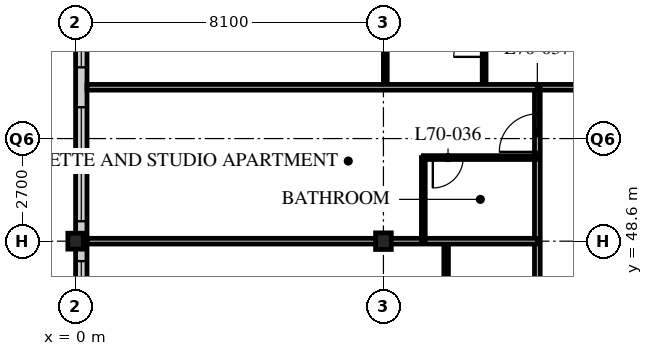
"""IFC4 building model, lengths in metres.
Left out: names, types, materials, properties, quantities, classifications, styles, units other than length and angle.
Written with IfcOpenShell. Run it as: python <this file> out.ifc"""

import sys

from ifc_helpers import new_model, si_unit, direction, frame, frame_2d, origin, origin_2d, place, context, subcontext, project, spatial, rectangle, i_section, extrude, element, fill, save


model = new_model("IFC4")
c1 = context("Model", 3, precision=1e-05, world=origin(), true_north=direction((0.0, 1.0)))
c2 = subcontext(c1, "Body", "Model", "MODEL_VIEW")
j1 = project(units=[si_unit("LENGTHUNIT", "METRE"), si_unit("PLANEANGLEUNIT", "RADIAN")], contexts=[c1])
p1 = place(None, origin())
s1 = spatial("IfcSite", under=j1, at=p1, CompositionType="ELEMENT")
p2 = place(p1, origin())
s2 = spatial("IfcBuilding", under=s1, at=p2, CompositionType="ELEMENT")
p3 = place(p2, frame((0.0, 0.0, 273.6)))
s3 = spatial("IfcBuildingStorey", under=s2, at=p3, CompositionType="ELEMENT", Elevation=273.6)
p4 = place(p3, frame((0.0, 48.6, 0.0), z_axis=(0.0, 0.0, 1.0), x_axis=(1.0, 0.0, 0.0)))
e1 = element("IfcColumn", 1, at=p4, inside=s3, PredefinedType="COLUMN", context=c2, shape_type="SweptSolid", body=[
    extrude(i_section(OverallWidth=0.407, OverallDepth=0.419, WebThickness=0.031, FlangeThickness=0.049, FilletRadius=0.015, at=origin_2d()), origin(), (0.0, 0.0, 1.0), 3.9),
])
p5 = place(p3, frame((8.1, 48.6, 0.0), z_axis=(0.0, 0.0, 1.0), x_axis=(1.0, 0.0, 0.0)))
e2 = element("IfcColumn", 2, at=p5, inside=s3, PredefinedType="COLUMN", context=c2, shape_type="SweptSolid", body=[
    extrude(i_section(OverallWidth=0.412, OverallDepth=0.437, WebThickness=0.036, FlangeThickness=0.058, FilletRadius=0.015, at=origin_2d()), origin(), (0.0, 0.0, 1.0), 3.9),
])
p6 = place(p3, frame((0.15, 56.4, 0.0), z_axis=(0.0, 0.0, 1.0), x_axis=(0.0, -1.0, 0.0)))
e3 = element("IfcWall", 3, at=p6, inside=s3, PredefinedType="SOLIDWALL", context=c2, shape_type="SweptSolid", body=[
    extrude(rectangle(XDim=32.1, YDim=0.3, at=frame_2d((16.05, 0.0))), origin(), (0.0, 0.0, 1.0), 3.69),
])
p7 = place(p6, frame((0.225, 0.0, 0.6)))
e4 = element("IfcOpeningElement", 4, at=p7, cuts=e3, PredefinedType="OPENING", context=c2, shape_type="SweptSolid", body=[
    extrude(rectangle(XDim=3.0, YDim=2.4, at=frame_2d((1.5, 1.2))), frame((0.0, 0.16, 0.0), z_axis=(0.0, -1.0, 0.0), x_axis=(1.0, 0.0, 0.0)), (0.0, 0.0, 1.0), 0.32),
])
p8 = place(p6, frame((4.275, 0.0, 0.6)))
e5 = element("IfcOpeningElement", 5, at=p8, cuts=e3, PredefinedType="OPENING", context=c2, shape_type="SweptSolid", body=[
    extrude(rectangle(XDim=3.0, YDim=2.4, at=frame_2d((1.5, 1.2))), frame((0.0, 0.16, 0.0), z_axis=(0.0, -1.0, 0.0), x_axis=(1.0, 0.0, 0.0)), (0.0, 0.0, 1.0), 0.32),
])
p9 = place(p6, frame((8.325, 0.0, 0.6)))
e6 = element("IfcOpeningElement", 6, at=p9, cuts=e3, PredefinedType="OPENING", context=c2, shape_type="SweptSolid", body=[
    extrude(rectangle(XDim=3.0, YDim=2.4, at=frame_2d((1.5, 1.2))), frame((0.0, 0.16, 0.0), z_axis=(0.0, -1.0, 0.0), x_axis=(1.0, 0.0, 0.0)), (0.0, 0.0, 1.0), 0.32),
])
p10 = place(p6, frame((12.375, 0.0, 0.6)))
e7 = element("IfcOpeningElement", 7, at=p10, cuts=e3, PredefinedType="OPENING", context=c2, shape_type="SweptSolid", body=[
    extrude(rectangle(XDim=3.0, YDim=2.4, at=frame_2d((1.5, 1.2))), frame((0.0, 0.16, 0.0), z_axis=(0.0, -1.0, 0.0), x_axis=(1.0, 0.0, 0.0)), (0.0, 0.0, 1.0), 0.32),
])
p11 = place(p6, frame((16.425, 0.0, 0.6)))
e8 = element("IfcOpeningElement", 8, at=p11, cuts=e3, PredefinedType="OPENING", context=c2, shape_type="SweptSolid", body=[
    extrude(rectangle(XDim=3.0, YDim=2.4, at=frame_2d((1.5, 1.2))), frame((0.0, 0.16, 0.0), z_axis=(0.0, -1.0, 0.0), x_axis=(1.0, 0.0, 0.0)), (0.0, 0.0, 1.0), 0.32),
])
p12 = place(p6, frame((20.475, 0.0, 0.6)))
e9 = element("IfcOpeningElement", 9, at=p12, cuts=e3, PredefinedType="OPENING", context=c2, shape_type="SweptSolid", body=[
    extrude(rectangle(XDim=3.0, YDim=2.4, at=frame_2d((1.5, 1.2))), frame((0.0, 0.16, 0.0), z_axis=(0.0, -1.0, 0.0), x_axis=(1.0, 0.0, 0.0)), (0.0, 0.0, 1.0), 0.32),
])
p13 = place(p6, frame((24.525, 0.0, 0.6)))
e10 = element("IfcOpeningElement", 10, at=p13, cuts=e3, PredefinedType="OPENING", context=c2, shape_type="SweptSolid", body=[
    extrude(rectangle(XDim=3.0, YDim=2.4, at=frame_2d((1.5, 1.2))), frame((0.0, 0.16, 0.0), z_axis=(0.0, -1.0, 0.0), x_axis=(1.0, 0.0, 0.0)), (0.0, 0.0, 1.0), 0.32),
])
p14 = place(p6, frame((28.575, 0.0, 0.6)))
e11 = element("IfcOpeningElement", 11, at=p14, cuts=e3, PredefinedType="OPENING", context=c2, shape_type="SweptSolid", body=[
    extrude(rectangle(XDim=3.0, YDim=2.4, at=frame_2d((1.5, 1.2))), frame((0.0, 0.16, 0.0), z_axis=(0.0, -1.0, 0.0), x_axis=(1.0, 0.0, 0.0)), (0.0, 0.0, 1.0), 0.32),
])
p15 = place(p3, frame((12.15, 52.65, 0.0), z_axis=(0.0, 0.0, 1.0), x_axis=(1.0, 0.0, 0.0)))
e12 = element("IfcWall", 12, at=p15, inside=s3, PredefinedType="PARTITIONING", context=c2, shape_type="SweptSolid", body=[
    extrude(rectangle(XDim=24.3, YDim=0.15, at=frame_2d((12.15, 0.0))), origin(), (0.0, 0.0, 1.0), 3.69),
])
p16 = place(p15, frame((6.4, 0.0, 0.0)))
e13 = element("IfcOpeningElement", 13, at=p16, cuts=e12, PredefinedType="OPENING", context=c2, shape_type="SweptSolid", body=[
    extrude(rectangle(XDim=1.0, YDim=2.1, at=frame_2d((0.5, 1.05))), frame((0.0, 0.085, 0.0), z_axis=(0.0, -1.0, 0.0), x_axis=(1.0, 0.0, 0.0)), (0.0, 0.0, 1.0), 0.17),
])
p17 = place(p15, frame((8.5, 0.0, 0.0)))
e14 = element("IfcOpeningElement", 14, at=p17, cuts=e12, PredefinedType="OPENING", context=c2, shape_type="SweptSolid", body=[
    extrude(rectangle(XDim=1.0, YDim=2.1, at=frame_2d((0.5, 1.05))), frame((0.0, 0.085, 0.0), z_axis=(0.0, -1.0, 0.0), x_axis=(1.0, 0.0, 0.0)), (0.0, 0.0, 1.0), 0.17),
])
p18 = place(p15, frame((16.6, 0.0, 0.0)))
e15 = element("IfcOpeningElement", 15, at=p18, cuts=e12, PredefinedType="OPENING", context=c2, shape_type="SweptSolid", body=[
    extrude(rectangle(XDim=1.0, YDim=2.1, at=frame_2d((0.5, 1.05))), frame((0.0, 0.085, 0.0), z_axis=(0.0, -1.0, 0.0), x_axis=(1.0, 0.0, 0.0)), (0.0, 0.0, 1.0), 0.17),
])
p19 = place(p15, frame((1.525, 0.0, 0.0)))
e16 = element("IfcOpeningElement", 16, at=p19, cuts=e12, PredefinedType="OPENING", context=c2, shape_type="SweptSolid", body=[
    extrude(rectangle(XDim=1.0, YDim=2.1, at=frame_2d((0.5, 1.05))), frame((0.0, 0.085, 0.0), z_axis=(0.0, -1.0, 0.0), x_axis=(1.0, 0.0, 0.0)), (0.0, 0.0, 1.0), 0.17),
])
p20 = place(p3, frame((12.15, 22.5, 0.0), z_axis=(0.0, 0.0, 1.0), x_axis=(0.0, 1.0, 0.0)))
e17 = element("IfcWall", 17, at=p20, inside=s3, PredefinedType="PARTITIONING", context=c2, shape_type="SweptSolid", body=[
    extrude(rectangle(XDim=30.15, YDim=0.15, at=frame_2d((15.075, 0.0))), origin(), (0.0, 0.0, 1.0), 3.69),
])
p21 = place(p20, frame((0.4, 0.0, 0.0)))
e18 = element("IfcOpeningElement", 18, at=p21, cuts=e17, PredefinedType="OPENING", context=c2, shape_type="SweptSolid", body=[
    extrude(rectangle(XDim=1.0, YDim=2.1, at=frame_2d((0.5, 1.05))), frame((0.0, 0.085, 0.0), z_axis=(0.0, -1.0, 0.0), x_axis=(1.0, 0.0, 0.0)), (0.0, 0.0, 1.0), 0.17),
])
p22 = place(p20, frame((18.4, 0.0, 0.0)))
e19 = element("IfcOpeningElement", 19, at=p22, cuts=e17, PredefinedType="OPENING", context=c2, shape_type="SweptSolid", body=[
    extrude(rectangle(XDim=1.0, YDim=2.1, at=frame_2d((0.5, 1.05))), frame((0.0, 0.085, 0.0), z_axis=(0.0, -1.0, 0.0), x_axis=(1.0, 0.0, 0.0)), (0.0, 0.0, 1.0), 0.17),
])
p23 = place(p20, frame((28.45, 0.0, 0.0)))
e20 = element("IfcOpeningElement", 20, at=p23, cuts=e17, PredefinedType="OPENING", context=c2, shape_type="SweptSolid", body=[
    extrude(rectangle(XDim=1.0, YDim=2.1, at=frame_2d((0.5, 1.05))), frame((0.0, 0.085, 0.0), z_axis=(0.0, -1.0, 0.0), x_axis=(1.0, 0.0, 0.0)), (0.0, 0.0, 1.0), 0.17),
])
p24 = place(p3, frame((9.75, 22.5, 0.0), z_axis=(0.0, 0.0, 1.0), x_axis=(0.0, 1.0, 0.0)))
e21 = element("IfcWall", 21, at=p24, inside=s3, PredefinedType="PARTITIONING", context=c2, shape_type="SweptSolid", body=[
    extrude(rectangle(XDim=26.1, YDim=0.12, at=frame_2d((13.05, 0.0))), origin(), (0.0, 0.0, 1.0), 3.69),
])
p25 = place(p24, frame((0.975, 0.0, 0.0)))
e22 = element("IfcOpeningElement", 22, at=p25, cuts=e21, PredefinedType="OPENING", context=c2, shape_type="SweptSolid", body=[
    extrude(rectangle(XDim=0.85, YDim=2.1, at=frame_2d((0.425, 1.05))), frame((0.0, 0.07, 0.0), z_axis=(0.0, -1.0, 0.0), x_axis=(1.0, 0.0, 0.0)), (0.0, 0.0, 1.0), 0.14),
])
p26 = place(p24, frame((10.225, 0.0, 0.0)))
e23 = element("IfcOpeningElement", 23, at=p26, cuts=e21, PredefinedType="OPENING", context=c2, shape_type="SweptSolid", body=[
    extrude(rectangle(XDim=0.85, YDim=2.1, at=frame_2d((0.425, 1.05))), frame((0.0, 0.07, 0.0), z_axis=(0.0, -1.0, 0.0), x_axis=(1.0, 0.0, 0.0)), (0.0, 0.0, 1.0), 0.14),
])
p27 = place(p24, frame((14.275, 0.0, 0.0)))
e24 = element("IfcOpeningElement", 24, at=p27, cuts=e21, PredefinedType="OPENING", context=c2, shape_type="SweptSolid", body=[
    extrude(rectangle(XDim=0.85, YDim=2.1, at=frame_2d((0.425, 1.05))), frame((0.0, 0.07, 0.0), z_axis=(0.0, -1.0, 0.0), x_axis=(1.0, 0.0, 0.0)), (0.0, 0.0, 1.0), 0.14),
])
p28 = place(p24, frame((18.975, 0.0, 0.0)))
e25 = element("IfcOpeningElement", 25, at=p28, cuts=e21, PredefinedType="OPENING", context=c2, shape_type="SweptSolid", body=[
    extrude(rectangle(XDim=0.85, YDim=2.1, at=frame_2d((0.425, 1.05))), frame((0.0, 0.07, 0.0), z_axis=(0.0, -1.0, 0.0), x_axis=(1.0, 0.0, 0.0)), (0.0, 0.0, 1.0), 0.14),
])
p29 = place(p24, frame((22.375, 0.0, 0.0)))
e26 = element("IfcOpeningElement", 26, at=p29, cuts=e21, PredefinedType="OPENING", context=c2, shape_type="SweptSolid", body=[
    extrude(rectangle(XDim=0.85, YDim=2.1, at=frame_2d((0.425, 1.05))), frame((0.0, 0.07, 0.0), z_axis=(0.0, -1.0, 0.0), x_axis=(1.0, 0.0, 0.0)), (0.0, 0.0, 1.0), 0.14),
])
p30 = place(p3, frame((12.15, 48.6, 0.0), z_axis=(0.0, 0.0, 1.0), x_axis=(-1.0, 0.0, 0.0)))
e27 = element("IfcWall", 27, at=p30, inside=s3, PredefinedType="PARTITIONING", context=c2, shape_type="SweptSolid", body=[
    extrude(rectangle(XDim=11.85, YDim=0.15, at=frame_2d((5.925, 0.0))), origin(), (0.0, 0.0, 1.0), 3.078),
])
p31 = place(p3, frame((9.15, 48.6, 0.0), z_axis=(0.0, 0.0, 1.0), x_axis=(0.0, 1.0, 0.0)))
e28 = element("IfcWall", 28, at=p31, inside=s3, PredefinedType="PARTITIONING", context=c2, shape_type="SweptSolid", body=[
    extrude(rectangle(XDim=2.2, YDim=0.1, at=frame_2d((1.1, 0.0))), origin(), (0.0, 0.0, 1.0), 3.69),
])
p32 = place(p3, frame((12.15, 50.8, 0.0), z_axis=(0.0, 0.0, 1.0), x_axis=(-1.0, 0.0, 0.0)))
e29 = element("IfcWall", 29, at=p32, inside=s3, PredefinedType="PARTITIONING", context=c2, shape_type="SweptSolid", body=[
    extrude(rectangle(XDim=3.0, YDim=0.1, at=frame_2d((1.5, 0.0))), origin(), (0.0, 0.0, 1.0), 3.69),
])
p33 = place(p32, frame((1.95, 0.0, 0.0)))
e30 = element("IfcOpeningElement", 30, at=p33, cuts=e29, PredefinedType="OPENING", context=c2, shape_type="SweptSolid", body=[
    extrude(rectangle(XDim=0.8, YDim=2.1, at=frame_2d((0.4, 1.05))), frame((0.0, 0.06, 0.0), z_axis=(0.0, -1.0, 0.0), x_axis=(1.0, 0.0, 0.0)), (0.0, 0.0, 1.0), 0.12),
])
p34 = place(p3, frame((10.75, 52.65, 0.0), z_axis=(0.0, 0.0, 1.0), x_axis=(0.0, 1.0, 0.0)))
e31 = element("IfcWall", 31, at=p34, inside=s3, PredefinedType="PARTITIONING", context=c2, shape_type="SweptSolid", body=[
    extrude(rectangle(XDim=2.4, YDim=0.1, at=frame_2d((1.2, 0.0))), origin(), (0.0, 0.0, 1.0), 3.69),
])
p35 = place(p34, frame((0.8, 0.0, 0.0)))
e32 = element("IfcOpeningElement", 32, at=p35, cuts=e31, PredefinedType="OPENING", context=c2, shape_type="SweptSolid", body=[
    extrude(rectangle(XDim=0.8, YDim=2.1, at=frame_2d((0.4, 1.05))), frame((0.0, 0.06, 0.0), z_axis=(0.0, -1.0, 0.0), x_axis=(1.0, 0.0, 0.0)), (0.0, 0.0, 1.0), 0.12),
])
p36 = place(p3, frame((8.15, 52.65, 0.0), z_axis=(0.0, 0.0, 1.0), x_axis=(0.0, 1.0, 0.0)))
e33 = element("IfcWall", 33, at=p36, inside=s3, PredefinedType="PARTITIONING", context=c2, shape_type="SweptSolid", body=[
    extrude(rectangle(XDim=2.4, YDim=0.1, at=frame_2d((1.2, 0.0))), origin(), (0.0, 0.0, 1.0), 3.078),
])
p37 = place(p3, frame((0.3, 52.65, 0.0), z_axis=(0.0, 0.0, 1.0), x_axis=(1.0, 0.0, 0.0)))
e34 = element("IfcWall", 34, at=p37, inside=s3, PredefinedType="PARTITIONING", context=c2, shape_type="SweptSolid", body=[
    extrude(rectangle(XDim=11.85, YDim=0.15, at=frame_2d((5.925, 0.0))), origin(), (0.0, 0.0, 1.0), 3.69),
])
p38 = place(p7, origin())
e35 = element("IfcWindow", 35, at=p38, inside=s3, PartitioningType="SINGLE_PANEL", PredefinedType="WINDOW", context=c2, shape_type="SweptSolid", body=[
    extrude(rectangle(XDim=3.0, YDim=2.4, at=frame_2d((1.5, 1.2))), frame((0.0, 0.03, 0.0), z_axis=(0.0, -1.0, 0.0), x_axis=(1.0, 0.0, 0.0)), (0.0, 0.0, 1.0), 0.06),
])
fill(e4, e35)
p39 = place(p8, origin())
e36 = element("IfcWindow", 36, at=p39, inside=s3, PartitioningType="SINGLE_PANEL", PredefinedType="WINDOW", context=c2, shape_type="SweptSolid", body=[
    extrude(rectangle(XDim=3.0, YDim=2.4, at=frame_2d((1.5, 1.2))), frame((0.0, 0.03, 0.0), z_axis=(0.0, -1.0, 0.0), x_axis=(1.0, 0.0, 0.0)), (0.0, 0.0, 1.0), 0.06),
])
fill(e5, e36)
p40 = place(p9, origin())
e37 = element("IfcWindow", 37, at=p40, inside=s3, PartitioningType="SINGLE_PANEL", PredefinedType="WINDOW", context=c2, shape_type="SweptSolid", body=[
    extrude(rectangle(XDim=3.0, YDim=2.4, at=frame_2d((1.5, 1.2))), frame((0.0, 0.03, 0.0), z_axis=(0.0, -1.0, 0.0), x_axis=(1.0, 0.0, 0.0)), (0.0, 0.0, 1.0), 0.06),
])
fill(e6, e37)
p41 = place(p33, origin())
e38 = element("IfcDoor", 38, at=p41, inside=s3, OperationType="SINGLE_SWING_RIGHT", PredefinedType="DOOR", context=c2, shape_type="SweptSolid", body=[
    extrude(rectangle(XDim=0.8, YDim=2.1, at=frame_2d((0.4, 1.05))), frame((0.0, 0.025, 0.0), z_axis=(0.0, -1.0, 0.0), x_axis=(1.0, 0.0, 0.0)), (0.0, 0.0, 1.0), 0.05),
])
fill(e30, e38)
p42 = place(p23, origin())
e39 = element("IfcDoor", 39, at=p42, inside=s3, OperationType="SINGLE_SWING_LEFT", PredefinedType="DOOR", context=c2, shape_type="SweptSolid", body=[
    extrude(rectangle(XDim=1.0, YDim=2.1, at=frame_2d((0.5, 1.05))), frame((0.0, 0.025, 0.0), z_axis=(0.0, -1.0, 0.0), x_axis=(1.0, 0.0, 0.0)), (0.0, 0.0, 1.0), 0.05),
])
fill(e20, e39)
p43 = place(p35, origin())
e40 = element("IfcDoor", 40, at=p43, inside=s3, OperationType="SINGLE_SWING_LEFT", PredefinedType="DOOR", context=c2, shape_type="SweptSolid", body=[
    extrude(rectangle(XDim=0.8, YDim=2.1, at=frame_2d((0.4, 1.05))), frame((0.0, 0.025, 0.0), z_axis=(0.0, -1.0, 0.0), x_axis=(1.0, 0.0, 0.0)), (0.0, 0.0, 1.0), 0.05),
])
fill(e32, e40)
save(model, sys.argv[1])
